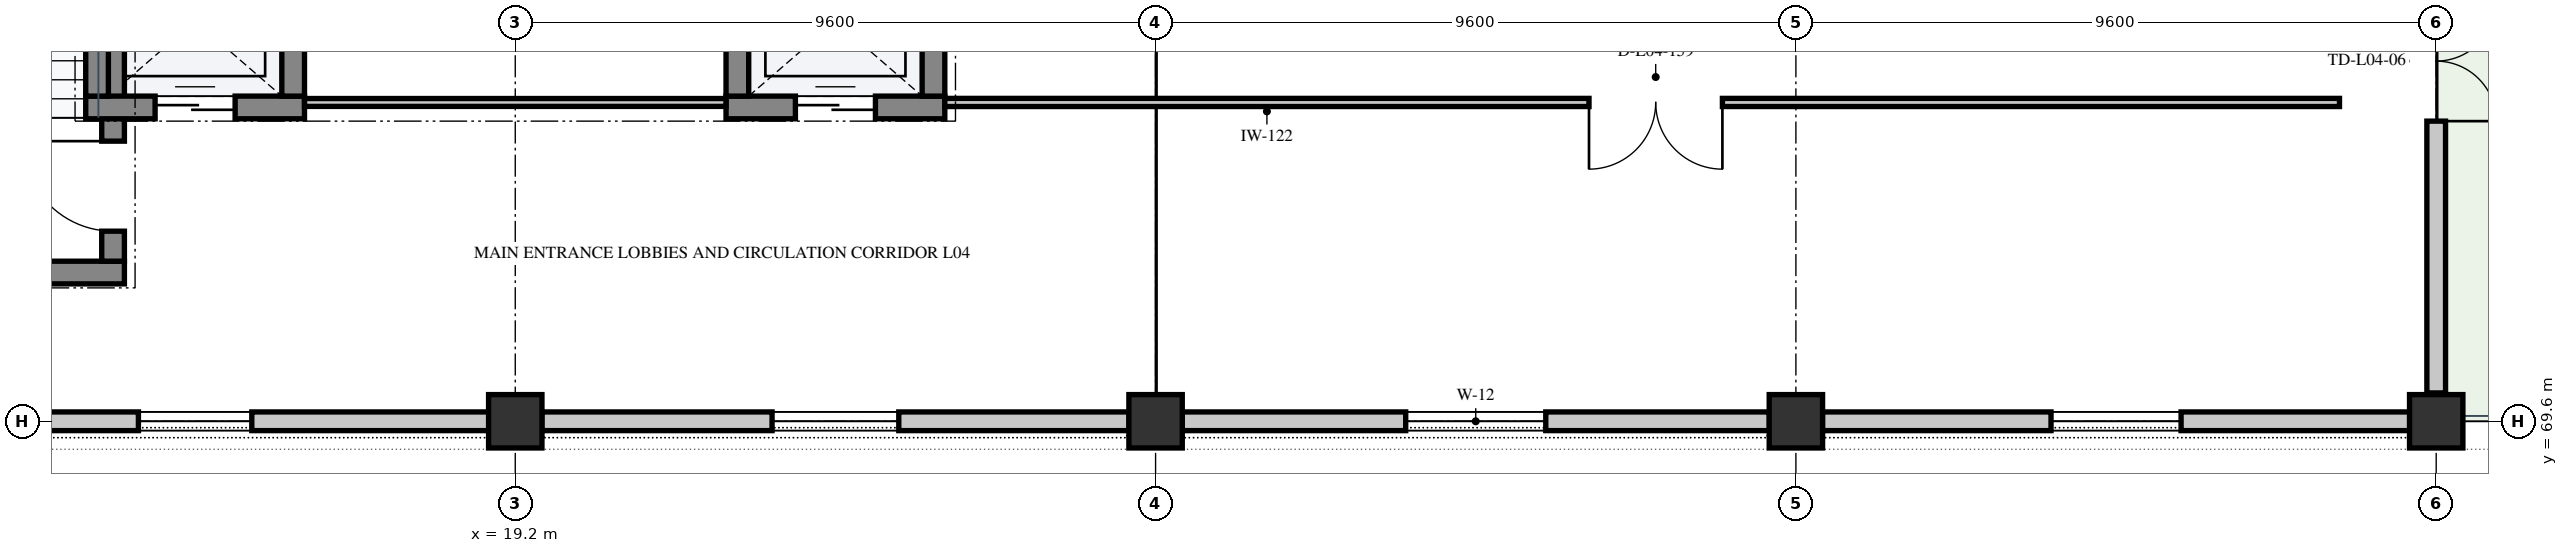
"""IFC4 building model, lengths in metres.
Left out: names, types, materials, properties, quantities, classifications, styles, units other than length and angle.
Written with IfcOpenShell. Run it as: python <this file> out.ifc"""

import sys

from ifc_helpers import new_model, si_unit, direction, frame, frame_2d, origin, origin_2d, place, context, subcontext, project, spatial, rectangle, extrude, element, fill, save


model = new_model("IFC4")
c1 = context("Model", 3, precision=1e-05, world=origin(), true_north=direction((0.0, 1.0)))
c2 = subcontext(c1, "Body", "Model", "MODEL_VIEW")
j1 = project(units=[si_unit("LENGTHUNIT", "METRE"), si_unit("PLANEANGLEUNIT", "RADIAN")], contexts=[c1])
p1 = place(None, origin())
s1 = spatial("IfcSite", under=j1, at=p1, CompositionType="ELEMENT")
p2 = place(p1, origin())
s2 = spatial("IfcBuilding", under=s1, at=p2, CompositionType="ELEMENT")
p3 = place(p2, frame((0.0, 0.0, 19.8)))
s3 = spatial("IfcBuildingStorey", under=s2, at=p3, CompositionType="ELEMENT", Elevation=19.8)
for number, where, z_axis, x_axis in (
    (1, (19.2, 69.6, 0.0), (0.0, 0.0, 1.0), (1.0, 0.0, 0.0)),
    (2, (28.8, 69.6, 0.0), (0.0, 0.0, 1.0), (1.0, 0.0, 0.0)),
    (3, (38.4, 69.6, 0.0), (0.0, 0.0, 1.0), (1.0, 0.0, 0.0)),
    (4, (48.0, 69.6, 0.0), (0.0, 0.0, 1.0), (1.0, 0.0, 0.0)),
):
    element("IfcColumn", number, at=place(p3, frame(where, z_axis=z_axis, x_axis=x_axis)), inside=s3, PredefinedType="COLUMN", context=c2, shape_type="SweptSolid", body=[
        extrude(rectangle(XDim=0.8, YDim=0.8, at=origin_2d()), origin(), (0.0, 0.0, 1.0), 4.8),
    ])
p4 = place(p3, frame((48.0, 78.775, 0.0), z_axis=(0.0, 0.0, 1.0), x_axis=(0.0, -1.0, 0.0)))
e5 = element("IfcWall", 5, at=p4, inside=s3, PredefinedType="SOLIDWALL", context=c2, shape_type="SweptSolid", body=[
    extrude(rectangle(XDim=8.75, YDim=0.28, at=frame_2d((4.375, 0.0))), origin(), (0.0, 0.0, 1.0), 3.645),
])
p5 = place(p4, frame((2.875, 0.0, 0.0)))
e6 = element("IfcOpeningElement", 6, at=p5, cuts=e5, PredefinedType="OPENING", context=c2, shape_type="SweptSolid", body=[
    extrude(rectangle(XDim=1.8, YDim=2.35, at=frame_2d((0.9, 1.175))), frame((0.0, 0.152, 0.0), z_axis=(0.0, -1.0, 0.0), x_axis=(1.0, 0.0, 0.0)), (0.0, 0.0, 1.0), 0.304),
])
p6 = place(p3, frame((47.602, 69.6, 0.0), z_axis=(0.0, 0.0, 1.0), x_axis=(-1.0, 0.0, 0.0)))
e7 = element("IfcWall", 7, at=p6, inside=s3, PredefinedType="SOLIDWALL", context=c2, shape_type="SweptSolid", body=[
    extrude(rectangle(XDim=8.804, YDim=0.28, at=frame_2d((4.402, 0.0))), origin(), (0.0, 0.0, 1.0), 3.645),
])
p7 = place(p6, frame((3.427, 0.0, 1.1)))
e8 = element("IfcOpeningElement", 8, at=p7, cuts=e7, PredefinedType="OPENING", context=c2, shape_type="SweptSolid", body=[
    extrude(rectangle(XDim=1.95, YDim=1.75, at=frame_2d((0.975, 0.875))), frame((0.0, 0.152, 0.0), z_axis=(0.0, -1.0, 0.0), x_axis=(1.0, 0.0, 0.0)), (0.0, 0.0, 1.0), 0.304),
])
p8 = place(p3, frame((38.002, 69.6, 0.0), z_axis=(0.0, 0.0, 1.0), x_axis=(-1.0, 0.0, 0.0)))
e9 = element("IfcWall", 9, at=p8, inside=s3, PredefinedType="SOLIDWALL", context=c2, shape_type="SweptSolid", body=[
    extrude(rectangle(XDim=8.804, YDim=0.28, at=frame_2d((4.402, 0.0))), origin(), (0.0, 0.0, 1.0), 3.42),
])
p9 = place(p8, frame((3.352, 0.0, 1.05)))
e10 = element("IfcOpeningElement", 10, at=p9, cuts=e9, PredefinedType="OPENING", context=c2, shape_type="SweptSolid", body=[
    extrude(rectangle(XDim=2.1, YDim=1.95, at=frame_2d((1.05, 0.975))), frame((0.0, 0.152, 0.0), z_axis=(0.0, -1.0, 0.0), x_axis=(1.0, 0.0, 0.0)), (0.0, 0.0, 1.0), 0.304),
])
p10 = place(p3, frame((28.402, 69.6, 0.0), z_axis=(0.0, 0.0, 1.0), x_axis=(-1.0, 0.0, 0.0)))
e11 = element("IfcWall", 11, at=p10, inside=s3, PredefinedType="SOLIDWALL", context=c2, shape_type="SweptSolid", body=[
    extrude(rectangle(XDim=8.804, YDim=0.28, at=frame_2d((4.402, 0.0))), origin(), (0.0, 0.0, 1.0), 3.42),
])
p11 = place(p10, frame((3.452, 0.0, 1.1)))
e12 = element("IfcOpeningElement", 12, at=p11, cuts=e11, PredefinedType="OPENING", context=c2, shape_type="SweptSolid", body=[
    extrude(rectangle(XDim=1.9, YDim=1.85, at=frame_2d((0.95, 0.925))), frame((0.0, 0.152, 0.0), z_axis=(0.0, -1.0, 0.0), x_axis=(1.0, 0.0, 0.0)), (0.0, 0.0, 1.0), 0.304),
])
p12 = place(p3, frame((18.802, 69.6, 0.0), z_axis=(0.0, 0.0, 1.0), x_axis=(-1.0, 0.0, 0.0)))
e13 = element("IfcWall", 13, at=p12, inside=s3, PredefinedType="SOLIDWALL", context=c2, shape_type="SweptSolid", body=[
    extrude(rectangle(XDim=8.804, YDim=0.28, at=frame_2d((4.402, 0.0))), origin(), (0.0, 0.0, 1.0), 3.42),
])
p13 = place(p12, frame((3.552, 0.0, 1.1)))
e14 = element("IfcOpeningElement", 14, at=p13, cuts=e13, PredefinedType="OPENING", context=c2, shape_type="SweptSolid", body=[
    extrude(rectangle(XDim=1.7, YDim=1.8, at=frame_2d((0.85, 0.9))), frame((0.0, 0.152, 0.0), z_axis=(0.0, -1.0, 0.0), x_axis=(1.0, 0.0, 0.0)), (0.0, 0.0, 1.0), 0.304),
])
p14 = place(p3, frame((8.16, 71.83, 0.0), z_axis=(0.0, 0.0, 1.0), x_axis=(1.0, 0.0, 0.0)))
e15 = element("IfcWall", 15, at=p14, inside=s3, PredefinedType="SHEAR", context=c2, shape_type="SweptSolid", body=[
    extrude(rectangle(XDim=5.18, YDim=0.34, at=frame_2d((2.59, 0.0))), origin(), (0.0, 0.0, 1.0), 4.48),
])
p15 = place(p3, frame((13.17, 72.0, 0.0), z_axis=(0.0, 0.0, 1.0), x_axis=(0.0, 1.0, 0.0)))
e16 = element("IfcWall", 16, at=p15, inside=s3, PredefinedType="SHEAR", context=c2, shape_type="SweptSolid", body=[
    extrude(rectangle(XDim=8.8, YDim=0.34, at=frame_2d((4.4, 0.0))), origin(), (0.0, 0.0, 1.0), 4.48),
])
p16 = place(p15, frame((0.45, 0.0, 0.0)))
e17 = element("IfcOpeningElement", 17, at=p16, cuts=e16, PredefinedType="OPENING", context=c2, shape_type="SweptSolid", body=[
    extrude(rectangle(XDim=1.35, YDim=2.2, at=frame_2d((0.675, 1.1))), frame((0.0, 0.182, 0.0), z_axis=(0.0, -1.0, 0.0), x_axis=(1.0, 0.0, 0.0)), (0.0, 0.0, 1.0), 0.364),
])
p17 = place(p3, frame((12.76, 74.305, 0.0), z_axis=(0.0, 0.0, 1.0), x_axis=(1.0, 0.0, 0.0)))
e18 = element("IfcWall", 18, at=p17, inside=s3, PredefinedType="SHEAR", context=c2, shape_type="SweptSolid", body=[
    extrude(rectangle(XDim=3.28, YDim=0.34, at=frame_2d((1.64, 0.0))), origin(), (0.0, 0.0, 1.0), 4.48),
])
p18 = place(p17, frame((1.04, 0.0, 0.0)))
e19 = element("IfcOpeningElement", 19, at=p18, cuts=e18, PredefinedType="OPENING", context=c2, shape_type="SweptSolid", body=[
    extrude(rectangle(XDim=1.2, YDim=2.2, at=frame_2d((0.6, 1.1))), frame((0.0, 0.182, 0.0), z_axis=(0.0, -1.0, 0.0), x_axis=(1.0, 0.0, 0.0)), (0.0, 0.0, 1.0), 0.364),
])
for number, where, z_axis, x_axis in (
    (20, (12.93, 74.475, 0.0), (0.0, 0.0, 1.0), (0.0, 1.0, 0.0)),
    (21, (15.87, 74.475, 0.0), (0.0, 0.0, 1.0), (0.0, 1.0, 0.0)),
):
    element("IfcWall", number, at=place(p3, frame(where, z_axis=z_axis, x_axis=x_axis)), inside=s3, PredefinedType="SHEAR", context=c2, shape_type="SweptSolid", body=[
        extrude(rectangle(XDim=2.25, YDim=0.34, at=frame_2d((1.125, 0.0))), origin(), (0.0, 0.0, 1.0), 4.48),
    ])
p19 = place(p3, frame((22.36, 74.305, 0.0), z_axis=(0.0, 0.0, 1.0), x_axis=(1.0, 0.0, 0.0)))
e22 = element("IfcWall", 22, at=p19, inside=s3, PredefinedType="SHEAR", context=c2, shape_type="SweptSolid", body=[
    extrude(rectangle(XDim=3.28, YDim=0.34, at=frame_2d((1.64, 0.0))), origin(), (0.0, 0.0, 1.0), 4.48),
])
p20 = place(p19, frame((1.04, 0.0, 0.0)))
e23 = element("IfcOpeningElement", 23, at=p20, cuts=e22, PredefinedType="OPENING", context=c2, shape_type="SweptSolid", body=[
    extrude(rectangle(XDim=1.2, YDim=2.2, at=frame_2d((0.6, 1.1))), frame((0.0, 0.182, 0.0), z_axis=(0.0, -1.0, 0.0), x_axis=(1.0, 0.0, 0.0)), (0.0, 0.0, 1.0), 0.364),
])
for number, where, z_axis, x_axis in (
    (24, (22.53, 74.475, 0.0), (0.0, 0.0, 1.0), (0.0, 1.0, 0.0)),
    (25, (25.47, 74.475, 0.0), (0.0, 0.0, 1.0), (0.0, 1.0, 0.0)),
):
    element("IfcWall", number, at=place(p3, frame(where, z_axis=z_axis, x_axis=x_axis)), inside=s3, PredefinedType="SHEAR", context=c2, shape_type="SweptSolid", body=[
        extrude(rectangle(XDim=2.25, YDim=0.34, at=frame_2d((1.125, 0.0))), origin(), (0.0, 0.0, 1.0), 4.48),
    ])
p21 = place(p3, frame((46.55, 74.38, 0.0), z_axis=(0.0, 0.0, 1.0), x_axis=(-1.0, 0.0, 0.0)))
e26 = element("IfcWall", 26, at=p21, inside=s3, PredefinedType="PARTITIONING", context=c2, shape_type="SweptSolid", body=[
    extrude(rectangle(XDim=20.91, YDim=0.122, at=frame_2d((10.455, 0.0))), origin(), (0.0, 0.0, 1.0), 3.42),
])
p22 = place(p21, frame((9.252, 0.0, 0.0)))
e27 = element("IfcOpeningElement", 27, at=p22, cuts=e26, PredefinedType="OPENING", context=c2, shape_type="SweptSolid", body=[
    extrude(rectangle(XDim=2.0, YDim=2.4, at=frame_2d((1.0, 1.2))), frame((0.0, 0.073, 0.0), z_axis=(0.0, -1.0, 0.0), x_axis=(1.0, 0.0, 0.0)), (0.0, 0.0, 1.0), 0.146),
])
p23 = place(p3, frame((22.36, 74.38, 0.0), z_axis=(0.0, 0.0, 1.0), x_axis=(-1.0, 0.0, 0.0)))
e28 = element("IfcWall", 28, at=p23, inside=s3, PredefinedType="PARTITIONING", context=c2, shape_type="SweptSolid", body=[
    extrude(rectangle(XDim=6.32, YDim=0.118, at=frame_2d((3.16, 0.0))), origin(), (0.0, 0.0, 1.0), 3.42),
])
p24 = place(p5, origin())
e29 = element("IfcDoor", 29, at=p24, inside=s3, OperationType="DOUBLE_DOOR_SINGLE_SWING", PredefinedType="DOOR", context=c2, shape_type="SweptSolid", body=[
    extrude(rectangle(XDim=1.8, YDim=2.35, at=frame_2d((0.9, 1.175))), frame((0.0, 0.025, 0.0), z_axis=(0.0, -1.0, 0.0), x_axis=(1.0, 0.0, 0.0)), (0.0, 0.0, 1.0), 0.05),
])
fill(e6, e29)
p25 = place(p7, origin())
e30 = element("IfcWindow", 30, at=p25, inside=s3, PartitioningType="SINGLE_PANEL", PredefinedType="WINDOW", context=c2, shape_type="SweptSolid", body=[
    extrude(rectangle(XDim=1.95, YDim=1.75, at=frame_2d((0.975, 0.875))), frame((0.0, 0.03, 0.0), z_axis=(0.0, -1.0, 0.0), x_axis=(1.0, 0.0, 0.0)), (0.0, 0.0, 1.0), 0.06),
])
fill(e8, e30)
p26 = place(p9, origin())
e31 = element("IfcWindow", 31, at=p26, inside=s3, PartitioningType="SINGLE_PANEL", PredefinedType="WINDOW", context=c2, shape_type="SweptSolid", body=[
    extrude(rectangle(XDim=2.1, YDim=1.95, at=frame_2d((1.05, 0.975))), frame((0.0, 0.03, 0.0), z_axis=(0.0, -1.0, 0.0), x_axis=(1.0, 0.0, 0.0)), (0.0, 0.0, 1.0), 0.06),
])
fill(e10, e31)
p27 = place(p11, origin())
e32 = element("IfcWindow", 32, at=p27, inside=s3, PartitioningType="SINGLE_PANEL", PredefinedType="WINDOW", context=c2, shape_type="SweptSolid", body=[
    extrude(rectangle(XDim=1.9, YDim=1.85, at=frame_2d((0.95, 0.925))), frame((0.0, 0.03, 0.0), z_axis=(0.0, -1.0, 0.0), x_axis=(1.0, 0.0, 0.0)), (0.0, 0.0, 1.0), 0.06),
])
fill(e12, e32)
p28 = place(p13, origin())
e33 = element("IfcWindow", 33, at=p28, inside=s3, PartitioningType="SINGLE_PANEL", PredefinedType="WINDOW", context=c2, shape_type="SweptSolid", body=[
    extrude(rectangle(XDim=1.7, YDim=1.8, at=frame_2d((0.85, 0.9))), frame((0.0, 0.03, 0.0), z_axis=(0.0, -1.0, 0.0), x_axis=(1.0, 0.0, 0.0)), (0.0, 0.0, 1.0), 0.06),
])
fill(e14, e33)
p29 = place(p16, origin())
e34 = element("IfcDoor", 34, at=p29, inside=s3, OperationType="SINGLE_SWING_RIGHT", PredefinedType="DOOR", context=c2, shape_type="SweptSolid", body=[
    extrude(rectangle(XDim=1.35, YDim=2.2, at=frame_2d((0.675, 1.1))), frame((0.0, 0.025, 0.0), z_axis=(0.0, -1.0, 0.0), x_axis=(1.0, 0.0, 0.0)), (0.0, 0.0, 1.0), 0.05),
])
fill(e17, e34)
p30 = place(p18, origin())
e35 = element("IfcDoor", 35, at=p30, inside=s3, OperationType="DOUBLE_DOOR_SLIDING", PredefinedType="DOOR", context=c2, shape_type="SweptSolid", body=[
    extrude(rectangle(XDim=1.2, YDim=2.2, at=frame_2d((0.6, 1.1))), frame((0.0, 0.025, 0.0), z_axis=(0.0, -1.0, 0.0), x_axis=(1.0, 0.0, 0.0)), (0.0, 0.0, 1.0), 0.05),
])
fill(e19, e35)
p31 = place(p20, origin())
e36 = element("IfcDoor", 36, at=p31, inside=s3, OperationType="DOUBLE_DOOR_SLIDING", PredefinedType="DOOR", context=c2, shape_type="SweptSolid", body=[
    extrude(rectangle(XDim=1.2, YDim=2.2, at=frame_2d((0.6, 1.1))), frame((0.0, 0.025, 0.0), z_axis=(0.0, -1.0, 0.0), x_axis=(1.0, 0.0, 0.0)), (0.0, 0.0, 1.0), 0.05),
])
fill(e23, e36)
p32 = place(p22, origin())
e37 = element("IfcDoor", 37, at=p32, inside=s3, OperationType="DOUBLE_DOOR_SINGLE_SWING", PredefinedType="DOOR", context=c2, shape_type="SweptSolid", body=[
    extrude(rectangle(XDim=2.0, YDim=2.4, at=frame_2d((1.0, 1.2))), frame((0.0, 0.025, 0.0), z_axis=(0.0, -1.0, 0.0), x_axis=(1.0, 0.0, 0.0)), (0.0, 0.0, 1.0), 0.05),
])
fill(e27, e37)
save(model, sys.argv[1])
